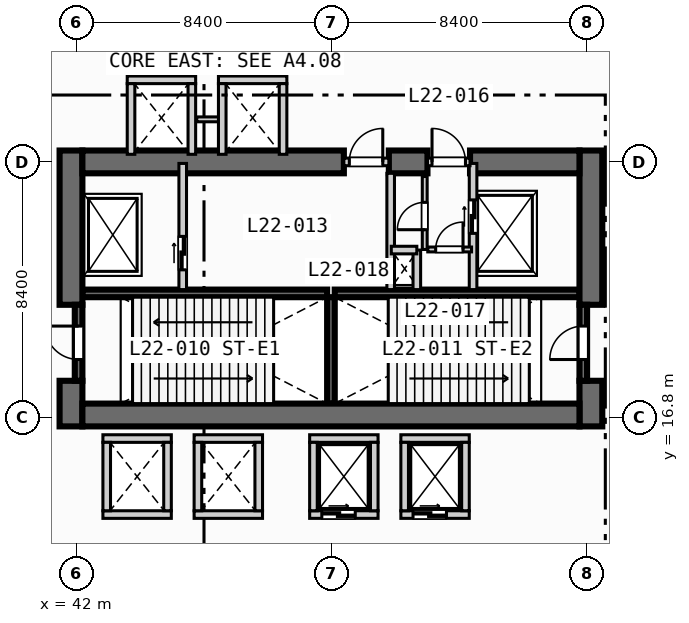
"""IFC4 building model, lengths in metres.
Left out: names, types, materials, properties, quantities, classifications, styles, units other than length and angle.
Written with IfcOpenShell. Run it as: python <this file> out.ifc"""

import sys

from ifc_helpers import new_model, si_unit, direction, frame, frame_2d, origin, place, context, subcontext, project, spatial, rectangle, extrude, element, fill, save


model = new_model("IFC4")
c1 = context("Model", 3, precision=1e-05, world=origin(), true_north=direction((0.0, 1.0)))
c2 = subcontext(c1, "Body", "Model", "MODEL_VIEW")
j1 = project(units=[si_unit("LENGTHUNIT", "METRE"), si_unit("PLANEANGLEUNIT", "RADIAN")], contexts=[c1])
p1 = place(None, origin())
s1 = spatial("IfcSite", under=j1, at=p1, CompositionType="ELEMENT")
p2 = place(p1, origin())
s2 = spatial("IfcBuilding", under=s1, at=p2, CompositionType="ELEMENT")
p3 = place(p2, frame((0.0, 0.0, 94.0)))
s3 = spatial("IfcBuildingStorey", under=s2, at=p3, CompositionType="ELEMENT", Elevation=94.0)
for number, where, z_axis, x_axis in (
    (1, (42.2, 20.875, 0.0), (0.0, 0.0, 1.0), (1.0, 0.0, 0.0)),
    (2, (50.5, 20.875, 0.0), (0.0, 0.0, 1.0), (1.0, 0.0, 0.0)),
):
    element("IfcWall", number, at=place(p3, frame(where, z_axis=z_axis, x_axis=x_axis)), inside=s3, PredefinedType="SOLIDWALL", context=c2, shape_type="SweptSolid", body=[
        extrude(rectangle(XDim=8.05, YDim=0.25, at=frame_2d((4.025, 0.0))), origin(), (0.0, 0.0, 1.0), 5.75),
    ])
p4 = place(p3, frame((50.375, 17.25, 0.0), z_axis=(0.0, 0.0, 1.0), x_axis=(0.0, 1.0, 0.0)))
e3 = element("IfcWall", 3, at=p4, inside=s3, PredefinedType="SOLIDWALL", context=c2, shape_type="SweptSolid", body=[
    extrude(rectangle(XDim=3.5, YDim=0.25, at=frame_2d((1.75, 0.0))), origin(), (0.0, 0.0, 1.0), 5.75),
])
p5 = place(p3, frame((41.825, 16.5, 0.0), z_axis=(0.0, 0.0, 1.0), x_axis=(0.0, 1.0, 0.0)))
e4 = element("IfcWall", 4, at=p5, inside=s3, PredefinedType="SHEAR", context=c2, shape_type="SweptSolid", body=[
    extrude(rectangle(XDim=1.5, YDim=0.75, at=frame_2d((0.75, 0.0))), origin(), (0.0, 0.0, 1.0), 5.75),
])
p6 = place(p3, frame((41.825, 20.5, 0.0), z_axis=(0.0, 0.0, 1.0), x_axis=(0.0, 1.0, 0.0)))
e5 = element("IfcWall", 5, at=p6, inside=s3, PredefinedType="SHEAR", context=c2, shape_type="SweptSolid", body=[
    extrude(rectangle(XDim=5.075, YDim=0.75, at=frame_2d((2.538, 0.0))), origin(), (0.0, 0.0, 1.0), 5.75),
])
p7 = place(p3, frame((58.925, 16.5, 0.0), z_axis=(0.0, 0.0, 1.0), x_axis=(0.0, 1.0, 0.0)))
e6 = element("IfcWall", 6, at=p7, inside=s3, PredefinedType="SHEAR", context=c2, shape_type="SweptSolid", body=[
    extrude(rectangle(XDim=1.5, YDim=0.75, at=frame_2d((0.75, 0.0))), origin(), (0.0, 0.0, 1.0), 5.75),
])
p8 = place(p3, frame((58.925, 20.5, 0.0), z_axis=(0.0, 0.0, 1.0), x_axis=(0.0, 1.0, 0.0)))
e7 = element("IfcWall", 7, at=p8, inside=s3, PredefinedType="SHEAR", context=c2, shape_type="SweptSolid", body=[
    extrude(rectangle(XDim=5.075, YDim=0.75, at=frame_2d((2.538, 0.0))), origin(), (0.0, 0.0, 1.0), 5.75),
])
p9 = place(p3, frame((42.2, 16.875, 0.0), z_axis=(0.0, 0.0, 1.0), x_axis=(1.0, 0.0, 0.0)))
e8 = element("IfcWall", 8, at=p9, inside=s3, PredefinedType="SHEAR", context=c2, shape_type="SweptSolid", body=[
    extrude(rectangle(XDim=16.35, YDim=0.75, at=frame_2d((8.175, 0.0))), origin(), (0.0, 0.0, 1.0), 5.75),
])
p10 = place(p3, frame((42.2, 25.2, 0.0), z_axis=(0.0, 0.0, 1.0), x_axis=(1.0, 0.0, 0.0)))
e9 = element("IfcWall", 9, at=p10, inside=s3, PredefinedType="SHEAR", context=c2, shape_type="SweptSolid", body=[
    extrude(rectangle(XDim=8.6, YDim=0.75, at=frame_2d((4.3, 0.0))), origin(), (0.0, 0.0, 1.0), 5.75),
])
p11 = place(p3, frame((52.28, 25.2, 0.0), z_axis=(0.0, 0.0, 1.0), x_axis=(1.0, 0.0, 0.0)))
e10 = element("IfcWall", 10, at=p11, inside=s3, PredefinedType="SHEAR", context=c2, shape_type="SweptSolid", body=[
    extrude(rectangle(XDim=1.27, YDim=0.75, at=frame_2d((0.635, 0.0))), origin(), (0.0, 0.0, 1.0), 5.75),
])
p12 = place(p3, frame((54.95, 25.2, 0.0), z_axis=(0.0, 0.0, 1.0), x_axis=(1.0, 0.0, 0.0)))
e11 = element("IfcWall", 11, at=p12, inside=s3, PredefinedType="SHEAR", context=c2, shape_type="SweptSolid", body=[
    extrude(rectangle(XDim=3.6, YDim=0.75, at=frame_2d((1.8, 0.0))), origin(), (0.0, 0.0, 1.0), 5.75),
])
p13 = place(p3, frame((42.075, 18.0, 0.0), z_axis=(0.0, 0.0, 1.0), x_axis=(0.0, 1.0, 0.0)))
e12 = element("IfcWall", 12, at=p13, inside=s3, PredefinedType="SOLIDWALL", context=c2, shape_type="SweptSolid", body=[
    extrude(rectangle(XDim=2.5, YDim=0.25, at=frame_2d((1.25, 0.0))), origin(), (0.0, 0.0, 1.0), 5.75),
])
p14 = place(p13, frame((0.7, 0.0, 0.0)))
e13 = element("IfcOpeningElement", 13, at=p14, cuts=e12, PredefinedType="OPENING", context=c2, shape_type="SweptSolid", body=[
    extrude(rectangle(XDim=1.1, YDim=2.15, at=frame_2d((0.55, 1.075))), frame((0.0, 0.135, 0.0), z_axis=(0.0, -1.0, 0.0), x_axis=(1.0, 0.0, 0.0)), (0.0, 0.0, 1.0), 0.27),
])
p15 = place(p3, frame((58.675, 18.0, 0.0), z_axis=(0.0, 0.0, 1.0), x_axis=(0.0, 1.0, 0.0)))
e14 = element("IfcWall", 14, at=p15, inside=s3, PredefinedType="SOLIDWALL", context=c2, shape_type="SweptSolid", body=[
    extrude(rectangle(XDim=2.5, YDim=0.25, at=frame_2d((1.25, 0.0))), origin(), (0.0, 0.0, 1.0), 5.75),
])
p16 = place(p15, frame((0.7, 0.0, 0.0)))
e15 = element("IfcOpeningElement", 15, at=p16, cuts=e14, PredefinedType="OPENING", context=c2, shape_type="SweptSolid", body=[
    extrude(rectangle(XDim=1.1, YDim=2.15, at=frame_2d((0.55, 1.075))), frame((0.0, 0.135, 0.0), z_axis=(0.0, -1.0, 0.0), x_axis=(1.0, 0.0, 0.0)), (0.0, 0.0, 1.0), 0.27),
])
p17 = place(p3, frame((45.5, 21.0, 0.0), z_axis=(0.0, 0.0, 1.0), x_axis=(0.0, 1.0, 0.0)))
e16 = element("IfcWall", 16, at=p17, inside=s3, PredefinedType="SOLIDWALL", context=c2, shape_type="SweptSolid", body=[
    extrude(rectangle(XDim=4.15, YDim=0.25, at=frame_2d((2.075, 0.0))), origin(), (0.0, 0.0, 1.0), 5.75),
])
p18 = place(p17, frame((0.65, 0.0, 0.0)))
e17 = element("IfcOpeningElement", 17, at=p18, cuts=e16, PredefinedType="OPENING", context=c2, shape_type="SweptSolid", body=[
    extrude(rectangle(XDim=1.1, YDim=2.15, at=frame_2d((0.55, 1.075))), frame((0.0, 0.135, 0.0), z_axis=(0.0, -1.0, 0.0), x_axis=(1.0, 0.0, 0.0)), (0.0, 0.0, 1.0), 0.27),
])
p19 = place(p3, frame((50.8, 25.2, 0.0), z_axis=(0.0, 0.0, 1.0), x_axis=(1.0, 0.0, 0.0)))
e18 = element("IfcWall", 18, at=p19, inside=s3, PredefinedType="SOLIDWALL", context=c2, shape_type="SweptSolid", body=[
    extrude(rectangle(XDim=1.48, YDim=0.25, at=frame_2d((0.74, 0.0))), origin(), (0.0, 0.0, 1.0), 5.75),
])
p20 = place(p19, frame((0.18, 0.0, 0.0)))
e19 = element("IfcOpeningElement", 19, at=p20, cuts=e18, PredefinedType="OPENING", context=c2, shape_type="SweptSolid", body=[
    extrude(rectangle(XDim=1.1, YDim=2.15, at=frame_2d((0.55, 1.075))), frame((0.0, 0.135, 0.0), z_axis=(0.0, -1.0, 0.0), x_axis=(1.0, 0.0, 0.0)), (0.0, 0.0, 1.0), 0.27),
])
p21 = place(p3, frame((52.34, 21.0, 0.0), z_axis=(0.0, 0.0, 1.0), x_axis=(0.0, 1.0, 0.0)))
e20 = element("IfcWall", 20, at=p21, inside=s3, PredefinedType="SOLIDWALL", context=c2, shape_type="SweptSolid", body=[
    extrude(rectangle(XDim=3.825, YDim=0.25, at=frame_2d((1.913, 0.0))), origin(), (0.0, 0.0, 1.0), 5.75),
])
p22 = place(p3, frame((55.05, 21.0, 0.0), z_axis=(0.0, 0.0, 1.0), x_axis=(0.0, 1.0, 0.0)))
e21 = element("IfcWall", 21, at=p22, inside=s3, PredefinedType="SOLIDWALL", context=c2, shape_type="SweptSolid", body=[
    extrude(rectangle(XDim=4.15, YDim=0.25, at=frame_2d((2.075, 0.0))), origin(), (0.0, 0.0, 1.0), 5.75),
])
p23 = place(p22, frame((1.85, 0.0, 0.0)))
e22 = element("IfcOpeningElement", 22, at=p23, cuts=e21, PredefinedType="OPENING", context=c2, shape_type="SweptSolid", body=[
    extrude(rectangle(XDim=1.1, YDim=2.15, at=frame_2d((0.55, 1.075))), frame((0.0, 0.135, 0.0), z_axis=(0.0, -1.0, 0.0), x_axis=(1.0, 0.0, 0.0)), (0.0, 0.0, 1.0), 0.27),
])
p24 = place(p3, frame((53.55, 25.2, 0.0), z_axis=(0.0, 0.0, 1.0), x_axis=(1.0, 0.0, 0.0)))
e23 = element("IfcWall", 23, at=p24, inside=s3, PredefinedType="SOLIDWALL", context=c2, shape_type="SweptSolid", body=[
    extrude(rectangle(XDim=1.4, YDim=0.25, at=frame_2d((0.7, 0.0))), origin(), (0.0, 0.0, 1.0), 5.75),
])
p25 = place(p24, frame((0.15, 0.0, 0.0)))
e24 = element("IfcOpeningElement", 24, at=p25, cuts=e23, PredefinedType="OPENING", context=c2, shape_type="SweptSolid", body=[
    extrude(rectangle(XDim=1.1, YDim=2.15, at=frame_2d((0.55, 1.075))), frame((0.0, 0.135, 0.0), z_axis=(0.0, -1.0, 0.0), x_axis=(1.0, 0.0, 0.0)), (0.0, 0.0, 1.0), 0.27),
])
p26 = place(p3, frame((53.2, 21.0, 0.0), z_axis=(0.0, 0.0, 1.0), x_axis=(0.0, 1.0, 0.0)))
e25 = element("IfcWall", 25, at=p26, inside=s3, PredefinedType="SOLIDWALL", context=c2, shape_type="SweptSolid", body=[
    extrude(rectangle(XDim=1.3, YDim=0.25, at=frame_2d((0.65, 0.0))), origin(), (0.0, 0.0, 1.0), 5.75),
])
p27 = place(p3, frame((52.36, 22.3, 0.0), z_axis=(0.0, 0.0, 1.0), x_axis=(1.0, 0.0, 0.0)))
e26 = element("IfcWall", 26, at=p27, inside=s3, PredefinedType="SOLIDWALL", context=c2, shape_type="SweptSolid", body=[
    extrude(rectangle(XDim=0.84, YDim=0.25, at=frame_2d((0.42, 0.0))), origin(), (0.0, 0.0, 1.0), 5.75),
])
p28 = place(p3, frame((53.56, 22.32, 0.0), z_axis=(0.0, 0.0, 1.0), x_axis=(1.0, 0.0, 0.0)))
e27 = element("IfcWall", 27, at=p28, inside=s3, PredefinedType="PARTITIONING", context=c2, shape_type="SweptSolid", body=[
    extrude(rectangle(XDim=1.44, YDim=0.16, at=frame_2d((0.72, 0.0))), origin(), (0.0, 0.0, 1.0), 5.75),
])
p29 = place(p28, frame((0.26, 0.0, 0.0)))
e28 = element("IfcOpeningElement", 28, at=p29, cuts=e27, PredefinedType="OPENING", context=c2, shape_type="SweptSolid", body=[
    extrude(rectangle(XDim=0.9, YDim=2.1, at=frame_2d((0.45, 1.05))), frame((0.0, 0.09, 0.0), z_axis=(0.0, -1.0, 0.0), x_axis=(1.0, 0.0, 0.0)), (0.0, 0.0, 1.0), 0.18),
])
p30 = place(p3, frame((53.46, 22.32, 0.0), z_axis=(0.0, 0.0, 1.0), x_axis=(0.0, 1.0, 0.0)))
e29 = element("IfcWall", 29, at=p30, inside=s3, PredefinedType="PARTITIONING", context=c2, shape_type="SweptSolid", body=[
    extrude(rectangle(XDim=2.4, YDim=0.16, at=frame_2d((1.2, 0.0))), origin(), (0.0, 0.0, 1.0), 5.75),
])
p31 = place(p30, frame((0.65, 0.0, 0.0)))
e30 = element("IfcOpeningElement", 30, at=p31, cuts=e29, PredefinedType="OPENING", context=c2, shape_type="SweptSolid", body=[
    extrude(rectangle(XDim=0.9, YDim=2.1, at=frame_2d((0.45, 1.05))), frame((0.0, 0.09, 0.0), z_axis=(0.0, -1.0, 0.0), x_axis=(1.0, 0.0, 0.0)), (0.0, 0.0, 1.0), 0.18),
])
for number, where, z_axis, x_axis in (
    (31, (42.875, 13.6, 0.0), (0.0, 0.0, 1.0), (1.0, 0.0, 0.0)),
    (32, (42.875, 16.1, 0.0), (0.0, 0.0, 1.0), (1.0, 0.0, 0.0)),
    (33, (43.0, 13.725, 0.0), (0.0, 0.0, 1.0), (0.0, 1.0, 0.0)),
    (34, (45.0, 13.725, 0.0), (0.0, 0.0, 1.0), (0.0, 1.0, 0.0)),
    (35, (45.875, 13.6, 0.0), (0.0, 0.0, 1.0), (1.0, 0.0, 0.0)),
    (36, (45.875, 16.1, 0.0), (0.0, 0.0, 1.0), (1.0, 0.0, 0.0)),
    (37, (46.0, 13.725, 0.0), (0.0, 0.0, 1.0), (0.0, 1.0, 0.0)),
    (38, (48.0, 13.725, 0.0), (0.0, 0.0, 1.0), (0.0, 1.0, 0.0)),
):
    element("IfcWall", number, at=place(p3, frame(where, z_axis=z_axis, x_axis=x_axis)), inside=s3, PredefinedType="SOLIDWALL", context=c2, shape_type="SweptSolid", body=[
        extrude(rectangle(XDim=2.25, YDim=0.25, at=frame_2d((1.125, 0.0))), origin(), (0.0, 0.0, 1.0), 5.75),
    ])
p32 = place(p3, frame((49.675, 13.6, 0.0), z_axis=(0.0, 0.0, 1.0), x_axis=(1.0, 0.0, 0.0)))
e39 = element("IfcWall", 39, at=p32, inside=s3, PredefinedType="SOLIDWALL", context=c2, shape_type="SweptSolid", body=[
    extrude(rectangle(XDim=2.25, YDim=0.25, at=frame_2d((1.125, 0.0))), origin(), (0.0, 0.0, 1.0), 5.75),
])
p33 = place(p32, frame((0.4, 0.0, 0.0)))
e40 = element("IfcOpeningElement", 40, at=p33, cuts=e39, PredefinedType="OPENING", context=c2, shape_type="SweptSolid", body=[
    extrude(rectangle(XDim=1.1, YDim=2.15, at=frame_2d((0.55, 1.075))), frame((0.0, 0.135, 0.0), z_axis=(0.0, -1.0, 0.0), x_axis=(1.0, 0.0, 0.0)), (0.0, 0.0, 1.0), 0.27),
])
for number, where, z_axis, x_axis in (
    (41, (49.675, 16.1, 0.0), (0.0, 0.0, 1.0), (1.0, 0.0, 0.0)),
    (42, (49.8, 13.725, 0.0), (0.0, 0.0, 1.0), (0.0, 1.0, 0.0)),
    (43, (51.8, 13.725, 0.0), (0.0, 0.0, 1.0), (0.0, 1.0, 0.0)),
):
    element("IfcWall", number, at=place(p3, frame(where, z_axis=z_axis, x_axis=x_axis)), inside=s3, PredefinedType="SOLIDWALL", context=c2, shape_type="SweptSolid", body=[
        extrude(rectangle(XDim=2.25, YDim=0.25, at=frame_2d((1.125, 0.0))), origin(), (0.0, 0.0, 1.0), 5.75),
    ])
p34 = place(p3, frame((52.675, 13.6, 0.0), z_axis=(0.0, 0.0, 1.0), x_axis=(1.0, 0.0, 0.0)))
e44 = element("IfcWall", 44, at=p34, inside=s3, PredefinedType="SOLIDWALL", context=c2, shape_type="SweptSolid", body=[
    extrude(rectangle(XDim=2.25, YDim=0.25, at=frame_2d((1.125, 0.0))), origin(), (0.0, 0.0, 1.0), 5.75),
])
p35 = place(p34, frame((0.4, 0.0, 0.0)))
e45 = element("IfcOpeningElement", 45, at=p35, cuts=e44, PredefinedType="OPENING", context=c2, shape_type="SweptSolid", body=[
    extrude(rectangle(XDim=1.1, YDim=2.15, at=frame_2d((0.55, 1.075))), frame((0.0, 0.135, 0.0), z_axis=(0.0, -1.0, 0.0), x_axis=(1.0, 0.0, 0.0)), (0.0, 0.0, 1.0), 0.27),
])
for number, where, z_axis, x_axis in (
    (46, (52.675, 16.1, 0.0), (0.0, 0.0, 1.0), (1.0, 0.0, 0.0)),
    (47, (52.8, 13.725, 0.0), (0.0, 0.0, 1.0), (0.0, 1.0, 0.0)),
    (48, (54.8, 13.725, 0.0), (0.0, 0.0, 1.0), (0.0, 1.0, 0.0)),
    (49, (43.675, 27.9, 0.0), (0.0, 0.0, 1.0), (1.0, 0.0, 0.0)),
):
    element("IfcWall", number, at=place(p3, frame(where, z_axis=z_axis, x_axis=x_axis)), inside=s3, PredefinedType="SOLIDWALL", context=c2, shape_type="SweptSolid", body=[
        extrude(rectangle(XDim=2.25, YDim=0.25, at=frame_2d((1.125, 0.0))), origin(), (0.0, 0.0, 1.0), 5.75),
    ])
for number, where, z_axis, x_axis in (
    (50, (43.8, 25.45, 0.0), (0.0, 0.0, 1.0), (0.0, 1.0, 0.0)),
    (51, (45.8, 25.45, 0.0), (0.0, 0.0, 1.0), (0.0, 1.0, 0.0)),
):
    element("IfcWall", number, at=place(p3, frame(where, z_axis=z_axis, x_axis=x_axis)), inside=s3, PredefinedType="SOLIDWALL", context=c2, shape_type="SweptSolid", body=[
        extrude(rectangle(XDim=2.325, YDim=0.25, at=frame_2d((1.163, 0.0))), origin(), (0.0, 0.0, 1.0), 5.75),
    ])
p36 = place(p3, frame((45.96, 26.6, 0.0), z_axis=(0.0, 0.0, 1.0), x_axis=(1.0, 0.0, 0.0)))
e52 = element("IfcWall", 52, at=p36, inside=s3, PredefinedType="PARTITIONING", context=c2, shape_type="SweptSolid", body=[
    extrude(rectangle(XDim=0.88, YDim=0.16, at=frame_2d((0.44, 0.0))), origin(), (0.0, 0.0, 1.0), 5.75),
])
p37 = place(p3, frame((46.675, 27.9, 0.0), z_axis=(0.0, 0.0, 1.0), x_axis=(1.0, 0.0, 0.0)))
e53 = element("IfcWall", 53, at=p37, inside=s3, PredefinedType="SOLIDWALL", context=c2, shape_type="SweptSolid", body=[
    extrude(rectangle(XDim=2.25, YDim=0.25, at=frame_2d((1.125, 0.0))), origin(), (0.0, 0.0, 1.0), 5.75),
])
for number, where, z_axis, x_axis in (
    (54, (46.8, 25.45, 0.0), (0.0, 0.0, 1.0), (0.0, 1.0, 0.0)),
    (55, (48.8, 25.45, 0.0), (0.0, 0.0, 1.0), (0.0, 1.0, 0.0)),
):
    element("IfcWall", number, at=place(p3, frame(where, z_axis=z_axis, x_axis=x_axis)), inside=s3, PredefinedType="SOLIDWALL", context=c2, shape_type="SweptSolid", body=[
        extrude(rectangle(XDim=2.325, YDim=0.25, at=frame_2d((1.163, 0.0))), origin(), (0.0, 0.0, 1.0), 5.75),
    ])
p38 = place(p14, origin())
e56 = element("IfcDoor", 56, at=p38, inside=s3, OperationType="SINGLE_SWING_RIGHT", PredefinedType="DOOR", context=c2, shape_type="SweptSolid", body=[
    extrude(rectangle(XDim=1.1, YDim=2.15, at=frame_2d((0.55, 1.075))), frame((0.0, 0.025, 0.0), z_axis=(0.0, -1.0, 0.0), x_axis=(1.0, 0.0, 0.0)), (0.0, 0.0, 1.0), 0.05),
])
fill(e13, e56)
p39 = place(p16, origin())
e57 = element("IfcDoor", 57, at=p39, inside=s3, OperationType="SINGLE_SWING_LEFT", PredefinedType="DOOR", context=c2, shape_type="SweptSolid", body=[
    extrude(rectangle(XDim=1.1, YDim=2.15, at=frame_2d((0.55, 1.075))), frame((0.0, 0.025, 0.0), z_axis=(0.0, -1.0, 0.0), x_axis=(1.0, 0.0, 0.0)), (0.0, 0.0, 1.0), 0.05),
])
fill(e15, e57)
p40 = place(p18, origin())
e58 = element("IfcDoor", 58, at=p40, inside=s3, OperationType="SLIDING_TO_LEFT", PredefinedType="DOOR", context=c2, shape_type="SweptSolid", body=[
    extrude(rectangle(XDim=1.1, YDim=2.15, at=frame_2d((0.55, 1.075))), frame((0.0, 0.025, 0.0), z_axis=(0.0, -1.0, 0.0), x_axis=(1.0, 0.0, 0.0)), (0.0, 0.0, 1.0), 0.05),
])
fill(e17, e58)
p41 = place(p20, origin())
e59 = element("IfcDoor", 59, at=p41, inside=s3, OperationType="SINGLE_SWING_RIGHT", PredefinedType="DOOR", context=c2, shape_type="SweptSolid", body=[
    extrude(rectangle(XDim=1.1, YDim=2.15, at=frame_2d((0.55, 1.075))), frame((0.0, 0.025, 0.0), z_axis=(0.0, -1.0, 0.0), x_axis=(1.0, 0.0, 0.0)), (0.0, 0.0, 1.0), 0.05),
])
fill(e19, e59)
p42 = place(p23, origin())
e60 = element("IfcDoor", 60, at=p42, inside=s3, OperationType="SLIDING_TO_LEFT", PredefinedType="DOOR", context=c2, shape_type="SweptSolid", body=[
    extrude(rectangle(XDim=1.1, YDim=2.15, at=frame_2d((0.55, 1.075))), frame((0.0, 0.025, 0.0), z_axis=(0.0, -1.0, 0.0), x_axis=(1.0, 0.0, 0.0)), (0.0, 0.0, 1.0), 0.05),
])
fill(e22, e60)
p43 = place(p25, origin())
e61 = element("IfcDoor", 61, at=p43, inside=s3, OperationType="SINGLE_SWING_LEFT", PredefinedType="DOOR", context=c2, shape_type="SweptSolid", body=[
    extrude(rectangle(XDim=1.1, YDim=2.15, at=frame_2d((0.55, 1.075))), frame((0.0, 0.025, 0.0), z_axis=(0.0, -1.0, 0.0), x_axis=(1.0, 0.0, 0.0)), (0.0, 0.0, 1.0), 0.05),
])
fill(e24, e61)
p44 = place(p29, origin())
e62 = element("IfcDoor", 62, at=p44, inside=s3, OperationType="SINGLE_SWING_RIGHT", PredefinedType="DOOR", context=c2, shape_type="SweptSolid", body=[
    extrude(rectangle(XDim=0.9, YDim=2.1, at=frame_2d((0.45, 1.05))), frame((0.0, 0.025, 0.0), z_axis=(0.0, -1.0, 0.0), x_axis=(1.0, 0.0, 0.0)), (0.0, 0.0, 1.0), 0.05),
])
fill(e28, e62)
p45 = place(p31, origin())
e63 = element("IfcDoor", 63, at=p45, inside=s3, OperationType="SINGLE_SWING_LEFT", PredefinedType="DOOR", context=c2, shape_type="SweptSolid", body=[
    extrude(rectangle(XDim=0.9, YDim=2.1, at=frame_2d((0.45, 1.05))), frame((0.0, 0.025, 0.0), z_axis=(0.0, -1.0, 0.0), x_axis=(1.0, 0.0, 0.0)), (0.0, 0.0, 1.0), 0.05),
])
fill(e30, e63)
p46 = place(p33, origin())
e64 = element("IfcDoor", 64, at=p46, inside=s3, OperationType="SLIDING_TO_LEFT", PredefinedType="DOOR", context=c2, shape_type="SweptSolid", body=[
    extrude(rectangle(XDim=1.1, YDim=2.15, at=frame_2d((0.55, 1.075))), frame((0.0, 0.025, 0.0), z_axis=(0.0, -1.0, 0.0), x_axis=(1.0, 0.0, 0.0)), (0.0, 0.0, 1.0), 0.05),
])
fill(e40, e64)
p47 = place(p35, origin())
e65 = element("IfcDoor", 65, at=p47, inside=s3, OperationType="SLIDING_TO_LEFT", PredefinedType="DOOR", context=c2, shape_type="SweptSolid", body=[
    extrude(rectangle(XDim=1.1, YDim=2.15, at=frame_2d((0.55, 1.075))), frame((0.0, 0.025, 0.0), z_axis=(0.0, -1.0, 0.0), x_axis=(1.0, 0.0, 0.0)), (0.0, 0.0, 1.0), 0.05),
])
fill(e45, e65)
save(model, sys.argv[1])
